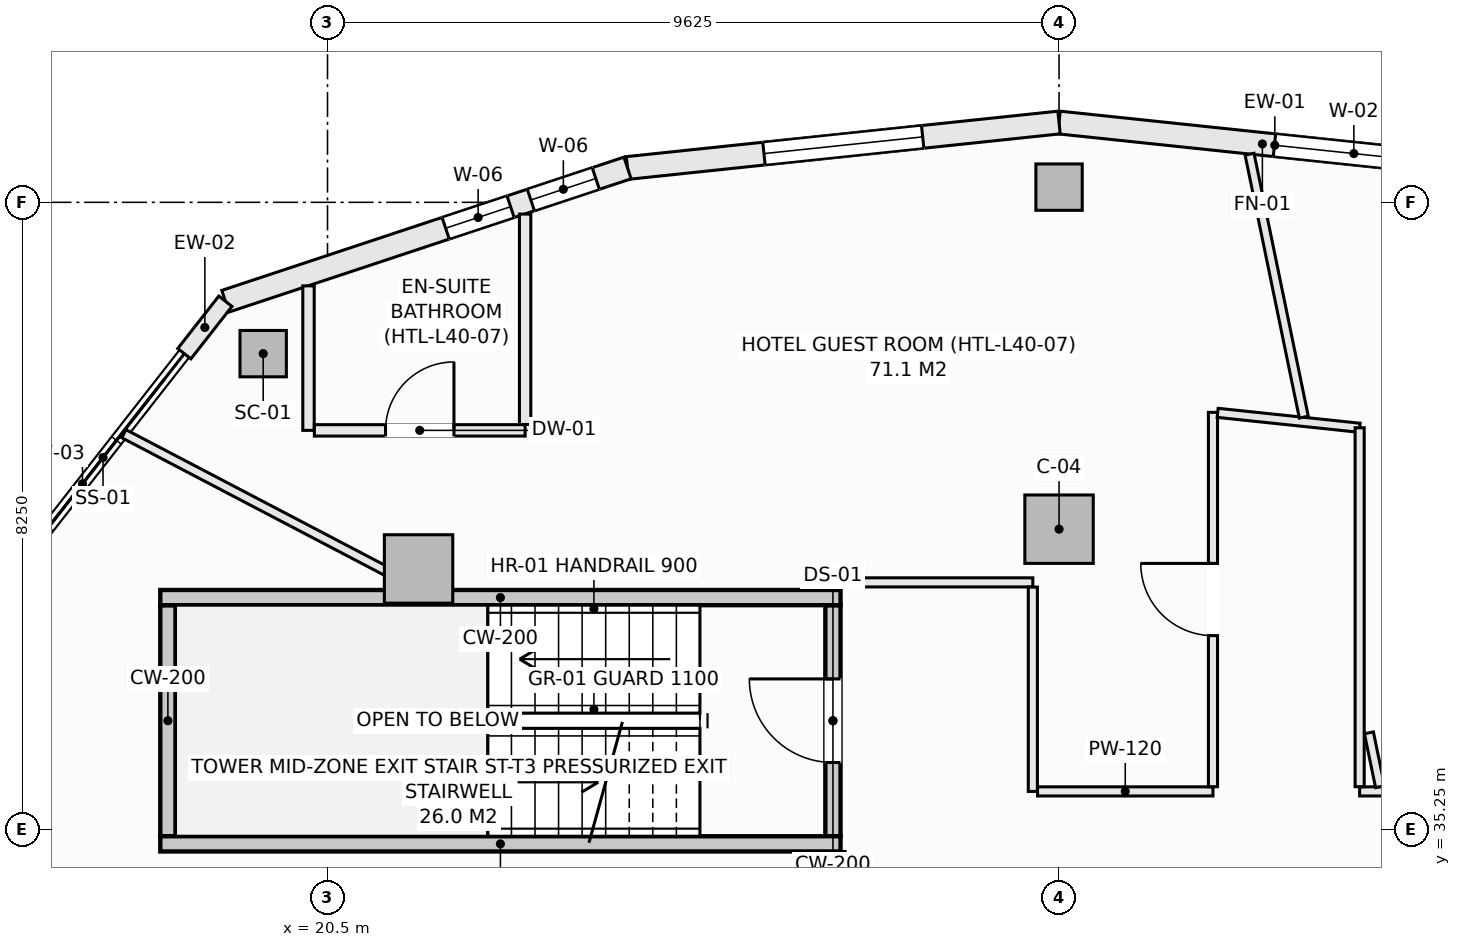
"""IFC4 building model, lengths in metres.
Left out: names, types, materials, properties, quantities, classifications, styles, units other than length and angle.
Written with IfcOpenShell. Run it as: python <this file> out.ifc"""

import sys

from ifc_helpers import new_model, si_unit, direction, frame, frame_2d, origin, origin_2d, place, context, subcontext, project, spatial, rectangle, hollow_rectangle, extrude, element, fill, save


model = new_model("IFC4")
c1 = context("Model", 3, precision=1e-05, world=origin(), true_north=direction((0.0, 1.0)))
c2 = subcontext(c1, "Body", "Model", "MODEL_VIEW")
j1 = project(units=[si_unit("LENGTHUNIT", "METRE"), si_unit("PLANEANGLEUNIT", "RADIAN")], contexts=[c1])
p1 = place(None, origin())
s1 = spatial("IfcSite", under=j1, at=p1, CompositionType="ELEMENT")
p2 = place(p1, origin())
s2 = spatial("IfcBuilding", under=s1, at=p2, CompositionType="ELEMENT")
p3 = place(p2, frame((0.0, 0.0, 156.3)))
s3 = spatial("IfcBuildingStorey", under=s2, at=p3, CompositionType="ELEMENT", Elevation=156.3)
for number, where, z_axis, x_axis in (
    (1, (30.125, 43.7, -0.27), (0.0, 0.0, 1.0), (1.0, 0.0, 0.0)),
    (2, (19.654, 41.51, -0.27), (0.0, 0.0, 1.0), (1.0, 0.0, 0.0)),
):
    element("IfcColumn", number, at=place(p3, frame(where, z_axis=z_axis, x_axis=x_axis)), inside=s3, PredefinedType="COLUMN", context=c2, shape_type="SweptSolid", body=[
        extrude(hollow_rectangle(XDim=0.61, YDim=0.61, WallThickness=0.025, at=origin_2d()), origin(), (0.0, 0.0, 1.0), 3.4),
    ])
for number, where, z_axis, x_axis in (
    (3, (30.125, 39.2, -0.27), (0.0, 0.0, 1.0), (1.0, 0.0, 0.0)),
    (4, (21.698, 38.677, -0.27), (0.0, 0.0, 1.0), (1.0, 0.0, 0.0)),
):
    element("IfcColumn", number, at=place(p3, frame(where, z_axis=z_axis, x_axis=x_axis)), inside=s3, PredefinedType="COLUMN", context=c2, shape_type="SweptSolid", body=[
        extrude(rectangle(XDim=0.9, YDim=0.9, at=origin_2d()), origin(), (0.0, 0.0, 1.0), 3.4),
    ])
p4 = place(p3, frame((30.125, 44.55, 0.0), z_axis=(0.0, 0.0, 1.0), x_axis=(0.994496545245, -0.104769372887, 0.0)))
e5 = element("IfcWall", 5, at=p4, inside=s3, PredefinedType="SOLIDWALL", context=c2, shape_type="SweptSolid", body=[
    extrude(rectangle(XDim=5.709, YDim=0.3, at=frame_2d((2.854, 0.0))), origin(), (0.0, 0.0, 1.0), 2.653),
])
p5 = place(p4, frame((2.85, 0.0, 0.74)))
e6 = element("IfcOpeningElement", 6, at=p5, cuts=e5, PredefinedType="OPENING", context=c2, shape_type="SweptSolid", body=[
    extrude(rectangle(XDim=2.1, YDim=1.7, at=frame_2d((1.05, 0.85))), frame((0.0, 0.16, 0.0), z_axis=(0.0, -1.0, 0.0), x_axis=(1.0, 0.0, 0.0)), (0.0, 0.0, 1.0), 0.32),
])
p6 = place(p3, frame((24.447, 43.952, 0.0), z_axis=(0.0, 0.0, 1.0), x_axis=(0.994496545245, 0.104769372887, 0.0)))
e7 = element("IfcWall", 7, at=p6, inside=s3, PredefinedType="SOLIDWALL", context=c2, shape_type="SweptSolid", body=[
    extrude(rectangle(XDim=5.709, YDim=0.3, at=frame_2d((2.854, 0.0))), origin(), (0.0, 0.0, 1.0), 2.653),
])
p7 = place(p6, frame((1.805, 0.0, 0.74)))
e8 = element("IfcOpeningElement", 8, at=p7, cuts=e7, PredefinedType="OPENING", context=c2, shape_type="SweptSolid", body=[
    extrude(rectangle(XDim=2.1, YDim=1.7, at=frame_2d((1.05, 0.85))), frame((0.0, 0.16, 0.0), z_axis=(0.0, -1.0, 0.0), x_axis=(1.0, 0.0, 0.0)), (0.0, 0.0, 1.0), 0.32),
])
p8 = place(p3, frame((19.156, 42.199, 0.0), z_axis=(0.0, 0.0, 1.0), x_axis=(0.949246811547, 0.314532177636, 0.0)))
e9 = element("IfcWall", 9, at=p8, inside=s3, PredefinedType="SOLIDWALL", context=c2, shape_type="SweptSolid", body=[
    extrude(rectangle(XDim=5.574, YDim=0.3, at=frame_2d((2.787, 0.0))), origin(), (0.0, 0.0, 1.0), 2.653),
])
p9 = place(p8, frame((3.053, 0.0, 0.74)))
e10 = element("IfcOpeningElement", 10, at=p9, cuts=e9, PredefinedType="OPENING", context=c2, shape_type="SweptSolid", body=[
    extrude(rectangle(XDim=0.9, YDim=1.7, at=frame_2d((0.45, 0.85))), frame((0.0, 0.16, 0.0), z_axis=(0.0, -1.0, 0.0), x_axis=(1.0, 0.0, 0.0)), (0.0, 0.0, 1.0), 0.32),
])
p10 = place(p8, frame((4.234, 0.0, 0.74)))
e11 = element("IfcOpeningElement", 11, at=p10, cuts=e9, PredefinedType="OPENING", context=c2, shape_type="SweptSolid", body=[
    extrude(rectangle(XDim=0.9, YDim=1.7, at=frame_2d((0.45, 0.85))), frame((0.0, 0.16, 0.0), z_axis=(0.0, -1.0, 0.0), x_axis=(1.0, 0.0, 0.0)), (0.0, 0.0, 1.0), 0.32),
])
p11 = place(p3, frame((18.616, 41.509, 0.0), z_axis=(0.0, 0.0, 1.0), x_axis=(0.616368366719, 0.787457958566, 0.0)))
e12 = element("IfcWall", 12, at=p11, inside=s3, PredefinedType="SOLIDWALL", context=c2, shape_type="SweptSolid", body=[
    extrude(rectangle(XDim=0.876, YDim=0.22, at=frame_2d((0.438, 0.0))), origin(), (0.0, 0.0, 1.0), 2.653),
])
p12 = place(p3, frame((27.15, 35.16, -0.27), z_axis=(0.0, 0.0, 1.0), x_axis=(0.0, 1.0, 0.0)))
e13 = element("IfcWall", 13, at=p12, inside=s3, PredefinedType="SHEAR", context=c2, shape_type="SweptSolid", body=[
    extrude(rectangle(XDim=3.04, YDim=0.2, at=frame_2d((1.52, 0.0))), origin(), (0.0, 0.0, 1.0), 3.4),
])
p13 = place(p12, frame((0.97, 0.0, 0.27)))
e14 = element("IfcOpeningElement", 14, at=p13, cuts=e13, PredefinedType="OPENING", context=c2, shape_type="SweptSolid", body=[
    extrude(rectangle(XDim=1.1, YDim=2.15, at=frame_2d((0.55, 1.075))), frame((0.0, 0.11, 0.0), z_axis=(0.0, -1.0, 0.0), x_axis=(1.0, 0.0, 0.0)), (0.0, 0.0, 1.0), 0.22),
])
p14 = place(p3, frame((18.4, 35.16, -0.27), z_axis=(0.0, 0.0, 1.0), x_axis=(0.0, 1.0, 0.0)))
e15 = element("IfcWall", 15, at=p14, inside=s3, PredefinedType="SHEAR", context=c2, shape_type="SweptSolid", body=[
    extrude(rectangle(XDim=3.04, YDim=0.2, at=frame_2d((1.52, 0.0))), origin(), (0.0, 0.0, 1.0), 3.4),
])
for number, where, z_axis, x_axis in (
    (16, (18.3, 38.3, -0.27), (0.0, 0.0, 1.0), (1.0, 0.0, 0.0)),
    (17, (18.3, 35.06, -0.27), (0.0, 0.0, 1.0), (1.0, 0.0, 0.0)),
):
    element("IfcWall", number, at=place(p3, frame(where, z_axis=z_axis, x_axis=x_axis)), inside=s3, PredefinedType="SHEAR", context=c2, shape_type="SweptSolid", body=[
        extrude(rectangle(XDim=8.95, YDim=0.2, at=frame_2d((4.475, 0.0))), origin(), (0.0, 0.0, 1.0), 3.4),
    ])
p15 = place(p3, frame((27.25, 34.152, 0.0), z_axis=(0.0, 0.0, 1.0), x_axis=(0.0, 1.0, 0.0)))
e18 = element("IfcWall", 18, at=p15, inside=s3, PredefinedType="PARTITIONING", context=c2, shape_type="SweptSolid", body=[
    extrude(rectangle(XDim=0.806, YDim=0.12, at=frame_2d((0.403, 0.0))), origin(), (0.0, 0.0, 1.0), 3.13),
])
p16 = place(p3, frame((27.25, 38.5, 0.0), z_axis=(0.0, 0.0, 1.0), x_axis=(1.0, 0.0, 0.0)))
e19 = element("IfcWall", 19, at=p16, inside=s3, PredefinedType="PARTITIONING", context=c2, shape_type="SweptSolid", body=[
    extrude(rectangle(XDim=2.53, YDim=0.12, at=frame_2d((1.265, 0.0))), origin(), (0.0, 0.0, 1.0), 3.13),
])
p17 = place(p3, frame((29.78, 35.75, 0.0), z_axis=(0.0, 0.0, 1.0), x_axis=(0.0, 1.0, 0.0)))
e20 = element("IfcWall", 20, at=p17, inside=s3, PredefinedType="PARTITIONING", context=c2, shape_type="SweptSolid", body=[
    extrude(rectangle(XDim=2.688, YDim=0.12, at=frame_2d((1.344, 0.0))), origin(), (0.0, 0.0, 1.0), 3.13),
])
p18 = place(p3, frame((29.842, 35.75, 0.0), z_axis=(0.0, 0.0, 1.0), x_axis=(1.0, 0.0, 0.0)))
e21 = element("IfcWall", 21, at=p18, inside=s3, PredefinedType="PARTITIONING", context=c2, shape_type="SweptSolid", body=[
    extrude(rectangle(XDim=2.308, YDim=0.12, at=frame_2d((1.154, 0.0))), origin(), (0.0, 0.0, 1.0), 3.13),
])
p19 = place(p3, frame((34.08, 35.75, 0.0), z_axis=(0.0, 0.0, 1.0), x_axis=(1.0, 0.0, 0.0)))
e22 = element("IfcWall", 22, at=p19, inside=s3, PredefinedType="PARTITIONING", context=c2, shape_type="SweptSolid", body=[
    extrude(rectangle(XDim=4.878, YDim=0.12, at=frame_2d((2.439, 0.0))), origin(), (0.0, 0.0, 1.0), 2.505),
])
p20 = place(p19, frame((1.544, 0.0, 0.0)))
e23 = element("IfcOpeningElement", 23, at=p20, cuts=e22, PredefinedType="OPENING", context=c2, shape_type="SweptSolid", body=[
    extrude(rectangle(XDim=0.95, YDim=2.1, at=frame_2d((0.475, 1.05))), frame((0.0, 0.07, 0.0), z_axis=(0.0, -1.0, 0.0), x_axis=(1.0, 0.0, 0.0)), (0.0, 0.0, 1.0), 0.14),
])
p21 = place(p3, frame((32.15, 35.812, 0.0), z_axis=(0.0, 0.0, 1.0), x_axis=(0.0, 1.0, 0.0)))
e24 = element("IfcWall", 24, at=p21, inside=s3, PredefinedType="PARTITIONING", context=c2, shape_type="SweptSolid", body=[
    extrude(rectangle(XDim=4.925, YDim=0.12, at=frame_2d((2.462, 0.0))), origin(), (0.0, 0.0, 1.0), 3.13),
])
p22 = place(p21, frame((1.988, 0.0, 0.0)))
e25 = element("IfcOpeningElement", 25, at=p22, cuts=e24, PredefinedType="OPENING", context=c2, shape_type="SweptSolid", body=[
    extrude(rectangle(XDim=0.95, YDim=2.1, at=frame_2d((0.475, 1.05))), frame((0.0, 0.07, 0.0), z_axis=(0.0, -1.0, 0.0), x_axis=(1.0, 0.0, 0.0)), (0.0, 0.0, 1.0), 0.14),
])
p23 = place(p3, frame((32.212, 40.73, 0.0), z_axis=(0.0, 0.0, 1.0), x_axis=(0.994511860417, -0.104623895405, 0.0)))
e26 = element("IfcWall", 26, at=p23, inside=s3, PredefinedType="PARTITIONING", context=c2, shape_type="SweptSolid", body=[
    extrude(rectangle(XDim=1.878, YDim=0.12, at=frame_2d((0.939, 0.0))), origin(), (0.0, 0.0, 1.0), 3.13),
])
p24 = place(p3, frame((34.08, 35.812, 0.0), z_axis=(0.0, 0.0, 1.0), x_axis=(0.0, 1.0, 0.0)))
e27 = element("IfcWall", 27, at=p24, inside=s3, PredefinedType="PARTITIONING", context=c2, shape_type="SweptSolid", body=[
    extrude(rectangle(XDim=4.722, YDim=0.12, at=frame_2d((2.361, 0.0))), origin(), (0.0, 0.0, 1.0), 2.812),
])
p25 = place(p3, frame((17.821, 40.456, 0.0), z_axis=(0.0, 0.0, 1.0), x_axis=(0.885899524476, -0.463877173974, 0.0)))
e28 = element("IfcWall", 28, at=p25, inside=s3, PredefinedType="PARTITIONING", context=c2, shape_type="SweptSolid", body=[
    extrude(rectangle(XDim=4.427, YDim=0.12, at=frame_2d((2.214, 0.0))), origin(), (0.0, 0.0, 1.0), 3.13),
])
p26 = place(p3, frame((32.631, 44.133, 0.0), z_axis=(0.0, 0.0, 1.0), x_axis=(0.202079954577, -0.979369027465, 0.0)))
e29 = element("IfcWall", 29, at=p26, inside=s3, PredefinedType="PARTITIONING", context=c2, shape_type="SweptSolid", body=[
    extrude(rectangle(XDim=3.533, YDim=0.12, at=frame_2d((1.766, 0.0))), origin(), (0.0, 0.0, 1.0), 3.13),
])
p27 = place(p3, frame((34.202, 36.521, 0.0), z_axis=(0.0, 0.0, 1.0), x_axis=(0.202081256143, -0.979368758903, 0.0)))
e30 = element("IfcWall", 30, at=p27, inside=s3, PredefinedType="PARTITIONING", context=c2, shape_type="SweptSolid", body=[
    extrude(rectangle(XDim=0.724, YDim=0.12, at=frame_2d((0.362, 0.0))), origin(), (0.0, 0.0, 1.0), 3.13),
])
p28 = place(p3, frame((20.25, 40.5, 0.0), z_axis=(0.0, 0.0, 1.0), x_axis=(0.0, 1.0, 0.0)))
e31 = element("IfcWall", 31, at=p28, inside=s3, PredefinedType="PARTITIONING", context=c2, shape_type="SweptSolid", body=[
    extrude(rectangle(XDim=1.901, YDim=0.15, at=frame_2d((0.95, 0.0))), origin(), (0.0, 0.0, 1.0), 2.505),
])
p29 = place(p3, frame((20.327, 40.5, 0.0), z_axis=(0.0, 0.0, 1.0), x_axis=(1.0, 0.0, 0.0)))
e32 = element("IfcWall", 32, at=p29, inside=s3, PredefinedType="PARTITIONING", context=c2, shape_type="SweptSolid", body=[
    extrude(rectangle(XDim=2.773, YDim=0.15, at=frame_2d((1.387, 0.0))), origin(), (0.0, 0.0, 1.0), 3.13),
])
p30 = place(p29, frame((0.937, 0.0, 0.0)))
e33 = element("IfcOpeningElement", 33, at=p30, cuts=e32, PredefinedType="OPENING", context=c2, shape_type="SweptSolid", body=[
    extrude(rectangle(XDim=0.9, YDim=2.1, at=frame_2d((0.45, 1.05))), frame((0.0, 0.085, 0.0), z_axis=(0.0, -1.0, 0.0), x_axis=(1.0, 0.0, 0.0)), (0.0, 0.0, 1.0), 0.17),
])
p31 = place(p3, frame((23.1, 40.577, 0.0), z_axis=(0.0, 0.0, 1.0), x_axis=(0.0, 1.0, 0.0)))
e34 = element("IfcWall", 34, at=p31, inside=s3, PredefinedType="PARTITIONING", context=c2, shape_type="SweptSolid", body=[
    extrude(rectangle(XDim=2.769, YDim=0.15, at=frame_2d((1.384, 0.0))), origin(), (0.0, 0.0, 1.0), 3.13),
])
p32 = place(p5, origin())
e35 = element("IfcWindow", 35, at=p32, inside=s3, PartitioningType="SINGLE_PANEL", PredefinedType="WINDOW", context=c2, shape_type="SweptSolid", body=[
    extrude(rectangle(XDim=2.1, YDim=1.7, at=frame_2d((1.05, 0.85))), frame((0.0, 0.03, 0.0), z_axis=(0.0, -1.0, 0.0), x_axis=(1.0, 0.0, 0.0)), (0.0, 0.0, 1.0), 0.06),
])
fill(e6, e35)
p33 = place(p7, origin())
e36 = element("IfcWindow", 36, at=p33, inside=s3, PartitioningType="SINGLE_PANEL", PredefinedType="WINDOW", context=c2, shape_type="SweptSolid", body=[
    extrude(rectangle(XDim=2.1, YDim=1.7, at=frame_2d((1.05, 0.85))), frame((0.0, 0.03, 0.0), z_axis=(0.0, -1.0, 0.0), x_axis=(1.0, 0.0, 0.0)), (0.0, 0.0, 1.0), 0.06),
])
fill(e8, e36)
p34 = place(p9, origin())
e37 = element("IfcWindow", 37, at=p34, inside=s3, PartitioningType="SINGLE_PANEL", PredefinedType="WINDOW", context=c2, shape_type="SweptSolid", body=[
    extrude(rectangle(XDim=0.9, YDim=1.7, at=frame_2d((0.45, 0.85))), frame((0.0, 0.03, 0.0), z_axis=(0.0, -1.0, 0.0), x_axis=(1.0, 0.0, 0.0)), (0.0, 0.0, 1.0), 0.06),
])
fill(e10, e37)
p35 = place(p13, origin())
e38 = element("IfcDoor", 38, at=p35, inside=s3, OperationType="SINGLE_SWING_RIGHT", PredefinedType="DOOR", context=c2, shape_type="SweptSolid", body=[
    extrude(rectangle(XDim=1.1, YDim=2.15, at=frame_2d((0.55, 1.075))), frame((0.0, 0.025, 0.0), z_axis=(0.0, -1.0, 0.0), x_axis=(1.0, 0.0, 0.0)), (0.0, 0.0, 1.0), 0.05),
])
fill(e14, e38)
p36 = place(p22, origin())
e39 = element("IfcDoor", 39, at=p36, inside=s3, OperationType="SINGLE_SWING_RIGHT", PredefinedType="DOOR", context=c2, shape_type="SweptSolid", body=[
    extrude(rectangle(XDim=0.95, YDim=2.1, at=frame_2d((0.475, 1.05))), frame((0.0, 0.025, 0.0), z_axis=(0.0, -1.0, 0.0), x_axis=(1.0, 0.0, 0.0)), (0.0, 0.0, 1.0), 0.05),
])
fill(e25, e39)
p37 = place(p30, origin())
e40 = element("IfcDoor", 40, at=p37, inside=s3, OperationType="SINGLE_SWING_RIGHT", PredefinedType="DOOR", context=c2, shape_type="SweptSolid", body=[
    extrude(rectangle(XDim=0.9, YDim=2.1, at=frame_2d((0.45, 1.05))), frame((0.0, 0.025, 0.0), z_axis=(0.0, -1.0, 0.0), x_axis=(1.0, 0.0, 0.0)), (0.0, 0.0, 1.0), 0.05),
])
fill(e33, e40)
p38 = place(p10, origin())
e41 = element("IfcWindow", 41, at=p38, inside=s3, PartitioningType="SINGLE_PANEL", PredefinedType="WINDOW", context=c2, shape_type="SweptSolid", body=[
    extrude(rectangle(XDim=0.9, YDim=1.7, at=frame_2d((0.45, 0.85))), frame((0.0, 0.03, 0.0), z_axis=(0.0, -1.0, 0.0), x_axis=(1.0, 0.0, 0.0)), (0.0, 0.0, 1.0), 0.06),
])
fill(e11, e41)
save(model, sys.argv[1])
